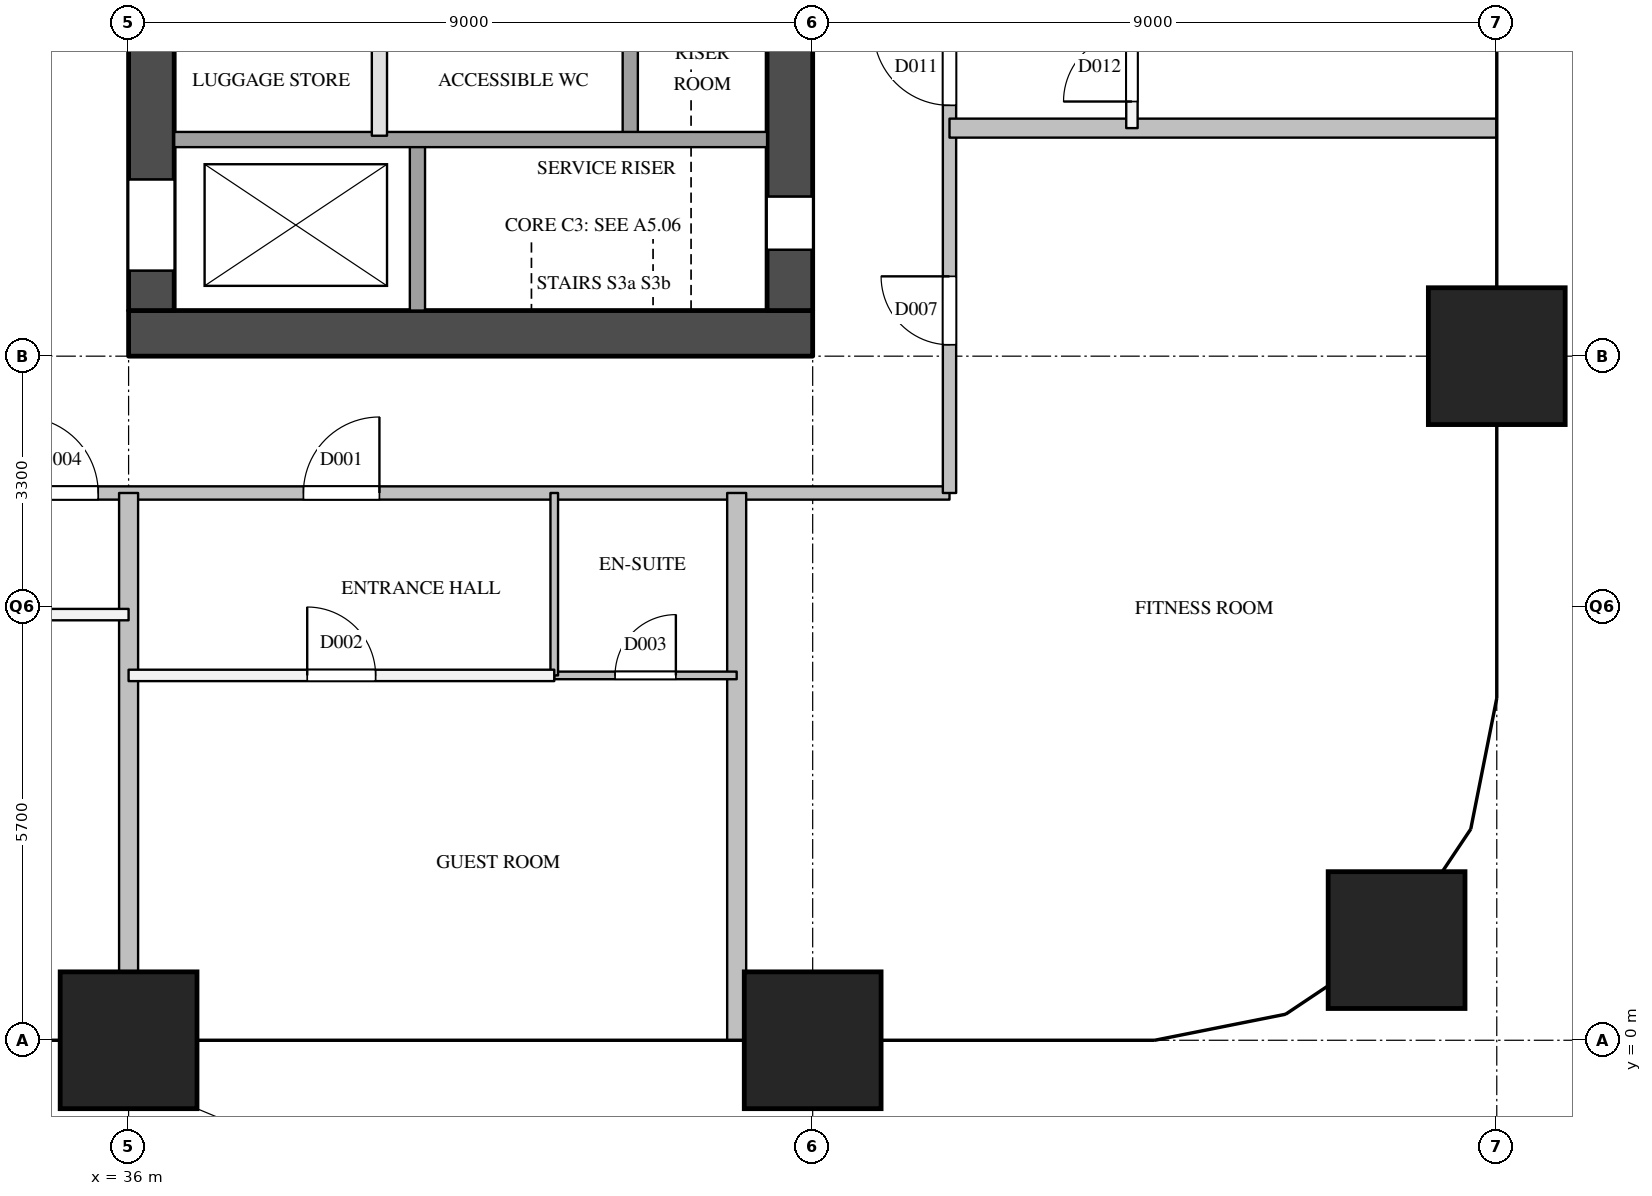
"""IFC4 building model, lengths in metres.
Left out: names, types, materials, properties, quantities, classifications, styles, units other than length and angle.
Written with IfcOpenShell. Run it as: python <this file> out.ifc"""

import sys

from ifc_helpers import new_model, si_unit, direction, frame, frame_2d, origin, origin_2d, place, context, subcontext, project, spatial, rectangle, extrude, element, fill, save


model = new_model("IFC4")
c1 = context("Model", 3, precision=1e-05, world=origin(), true_north=direction((0.0, 1.0)))
c2 = subcontext(c1, "Body", "Model", "MODEL_VIEW")
j1 = project(units=[si_unit("LENGTHUNIT", "METRE"), si_unit("PLANEANGLEUNIT", "RADIAN")], contexts=[c1])
p1 = place(None, origin())
s1 = spatial("IfcSite", under=j1, at=p1, CompositionType="ELEMENT")
p2 = place(p1, origin())
s2 = spatial("IfcBuilding", under=s1, at=p2, CompositionType="ELEMENT")
p3 = place(p2, frame((0.0, 0.0, 108.2)))
s3 = spatial("IfcBuildingStorey", under=s2, at=p3, CompositionType="ELEMENT", Elevation=108.2)
for number, where, z_axis, x_axis in (
    (1, (36.0, 0.0, 0.0), (0.0, 0.0, 1.0), (1.0, 0.0, 0.0)),
    (2, (45.0, 0.0, 0.0), (0.0, 0.0, 1.0), (1.0, 0.0, 0.0)),
    (3, (52.682, 1.318, 0.0), (0.0, 0.0, 1.0), (1.0, 0.0, 0.0)),
    (4, (54.0, 9.0, 0.0), (0.0, 0.0, 1.0), (1.0, 0.0, 0.0)),
):
    element("IfcColumn", number, at=place(p3, frame(where, z_axis=z_axis, x_axis=x_axis)), inside=s3, PredefinedType="COLUMN", context=c2, shape_type="SweptSolid", body=[
        extrude(rectangle(XDim=1.8, YDim=1.8, at=origin_2d()), origin(), (0.0, 0.0, 1.0), 3.8),
    ])
p4 = place(p3, frame((36.0, 9.3, 0.0), z_axis=(0.0, 0.0, 1.0), x_axis=(1.0, 0.0, 0.0)))
e5 = element("IfcWall", 5, at=p4, inside=s3, PredefinedType="SHEAR", context=c2, shape_type="SweptSolid", body=[
    extrude(rectangle(XDim=9.0, YDim=0.6, at=frame_2d((4.5, 0.0))), origin(), (0.0, 0.0, 1.0), 3.5),
])
p5 = place(p3, frame((36.3, 9.6, 0.0), z_axis=(0.0, 0.0, 1.0), x_axis=(0.0, 1.0, 0.0)))
e6 = element("IfcWall", 6, at=p5, inside=s3, PredefinedType="SHEAR", context=c2, shape_type="SweptSolid", body=[
    extrude(rectangle(XDim=12.3, YDim=0.6, at=frame_2d((6.15, 0.0))), origin(), (0.0, 0.0, 1.0), 3.5),
])
p6 = place(p5, frame((0.525, 0.0, 0.0)))
e7 = element("IfcOpeningElement", 7, at=p6, cuts=e6, PredefinedType="OPENING", context=c2, shape_type="SweptSolid", body=[
    extrude(rectangle(XDim=1.2, YDim=2.1, at=frame_2d((0.6, 1.05))), frame((0.0, 0.31, 0.0), z_axis=(0.0, -1.0, 0.0), x_axis=(1.0, 0.0, 0.0)), (0.0, 0.0, 1.0), 0.62),
])
p7 = place(p5, frame((4.8, 0.0, 0.0)))
e8 = element("IfcOpeningElement", 8, at=p7, cuts=e6, PredefinedType="OPENING", context=c2, shape_type="SweptSolid", body=[
    extrude(rectangle(XDim=1.0, YDim=2.1, at=frame_2d((0.5, 1.05))), frame((0.0, 0.31, 0.0), z_axis=(0.0, -1.0, 0.0), x_axis=(1.0, 0.0, 0.0)), (0.0, 0.0, 1.0), 0.62),
])
p8 = place(p3, frame((44.7, 9.6, 0.0), z_axis=(0.0, 0.0, 1.0), x_axis=(0.0, 1.0, 0.0)))
e9 = element("IfcWall", 9, at=p8, inside=s3, PredefinedType="SHEAR", context=c2, shape_type="SweptSolid", body=[
    extrude(rectangle(XDim=12.3, YDim=0.6, at=frame_2d((6.15, 0.0))), origin(), (0.0, 0.0, 1.0), 3.5),
])
p9 = place(p8, frame((0.8, 0.0, 0.0)))
e10 = element("IfcOpeningElement", 10, at=p9, cuts=e9, PredefinedType="OPENING", context=c2, shape_type="SweptSolid", body=[
    extrude(rectangle(XDim=0.7, YDim=2.1, at=frame_2d((0.35, 1.05))), frame((0.0, 0.31, 0.0), z_axis=(0.0, -1.0, 0.0), x_axis=(1.0, 0.0, 0.0)), (0.0, 0.0, 1.0), 0.62),
])
p10 = place(p3, frame((39.3, 11.9, 0.0), z_axis=(0.0, 0.0, 1.0), x_axis=(0.0, 1.0, 0.0)))
e11 = element("IfcWall", 11, at=p10, inside=s3, PredefinedType="PARTITIONING", context=c2, shape_type="SweptSolid", body=[
    extrude(rectangle(XDim=2.2, YDim=0.2, at=frame_2d((1.1, 0.0))), origin(), (0.0, 0.0, 1.0), 3.5),
])
p11 = place(p3, frame((39.8, 9.6, 0.0), z_axis=(0.0, 0.0, 1.0), x_axis=(0.0, 1.0, 0.0)))
e12 = element("IfcWall", 12, at=p11, inside=s3, PredefinedType="SOLIDWALL", context=c2, shape_type="SweptSolid", body=[
    extrude(rectangle(XDim=2.3, YDim=0.2, at=frame_2d((1.15, 0.0))), origin(), (0.0, 0.0, 1.0), 3.5),
])
p12 = place(p3, frame((42.6, 11.9, 0.0), z_axis=(0.0, 0.0, 1.0), x_axis=(0.0, 1.0, 0.0)))
e13 = element("IfcWall", 13, at=p12, inside=s3, PredefinedType="SOLIDWALL", context=c2, shape_type="SweptSolid", body=[
    extrude(rectangle(XDim=2.2, YDim=0.2, at=frame_2d((1.1, 0.0))), origin(), (0.0, 0.0, 1.0), 3.5),
])
p13 = place(p3, frame((36.6, 11.85, 0.0), z_axis=(0.0, 0.0, 1.0), x_axis=(1.0, 0.0, 0.0)))
e14 = element("IfcWall", 14, at=p13, inside=s3, PredefinedType="SOLIDWALL", context=c2, shape_type="SweptSolid", body=[
    extrude(rectangle(XDim=7.8, YDim=0.2, at=frame_2d((3.9, 0.0))), origin(), (0.0, 0.0, 1.0), 3.5),
])
p14 = place(p3, frame((34.2, 7.2, 0.0), z_axis=(0.0, 0.0, 1.0), x_axis=(1.0, 0.0, 0.0)))
e15 = element("IfcWall", 15, at=p14, inside=s3, PredefinedType="PARTITIONING", context=c2, shape_type="SweptSolid", body=[
    extrude(rectangle(XDim=12.6, YDim=0.175, at=frame_2d((6.3, 0.0))), origin(), (0.0, 0.0, 1.0), 3.5),
])
p15 = place(p14, frame((4.1, 0.0, 0.0)))
e16 = element("IfcOpeningElement", 16, at=p15, cuts=e15, PredefinedType="OPENING", context=c2, shape_type="SweptSolid", body=[
    extrude(rectangle(XDim=1.0, YDim=2.1, at=frame_2d((0.5, 1.05))), frame((0.0, 0.097, 0.0), z_axis=(0.0, -1.0, 0.0), x_axis=(1.0, 0.0, 0.0)), (0.0, 0.0, 1.0), 0.195),
])
p16 = place(p14, frame((0.4, 0.0, 0.0)))
e17 = element("IfcOpeningElement", 17, at=p16, cuts=e15, PredefinedType="OPENING", context=c2, shape_type="SweptSolid", body=[
    extrude(rectangle(XDim=1.0, YDim=2.1, at=frame_2d((0.5, 1.05))), frame((0.0, 0.097, 0.0), z_axis=(0.0, -1.0, 0.0), x_axis=(1.0, 0.0, 0.0)), (0.0, 0.0, 1.0), 0.195),
])
p17 = place(p3, frame((46.8, 7.2, 0.0), z_axis=(0.0, 0.0, 1.0), x_axis=(0.0, 1.0, 0.0)))
e18 = element("IfcWall", 18, at=p17, inside=s3, PredefinedType="PARTITIONING", context=c2, shape_type="SweptSolid", body=[
    extrude(rectangle(XDim=16.49, YDim=0.175, at=frame_2d((8.245, 0.0))), origin(), (0.0, 0.0, 1.0), 3.5),
])
p18 = place(p17, frame((1.95, 0.0, 0.0)))
e19 = element("IfcOpeningElement", 19, at=p18, cuts=e18, PredefinedType="OPENING", context=c2, shape_type="SweptSolid", body=[
    extrude(rectangle(XDim=0.9, YDim=2.1, at=frame_2d((0.45, 1.05))), frame((0.0, 0.097, 0.0), z_axis=(0.0, -1.0, 0.0), x_axis=(1.0, 0.0, 0.0)), (0.0, 0.0, 1.0), 0.195),
])
p19 = place(p17, frame((5.1, 0.0, 0.0)))
e20 = element("IfcOpeningElement", 20, at=p19, cuts=e18, PredefinedType="OPENING", context=c2, shape_type="SweptSolid", body=[
    extrude(rectangle(XDim=1.0, YDim=2.1, at=frame_2d((0.5, 1.05))), frame((0.0, 0.097, 0.0), z_axis=(0.0, -1.0, 0.0), x_axis=(1.0, 0.0, 0.0)), (0.0, 0.0, 1.0), 0.195),
])
p20 = place(p17, frame((11.1, 0.0, 0.0)))
e21 = element("IfcOpeningElement", 21, at=p20, cuts=e18, PredefinedType="OPENING", context=c2, shape_type="SweptSolid", body=[
    extrude(rectangle(XDim=1.0, YDim=2.1, at=frame_2d((0.5, 1.05))), frame((0.0, 0.097, 0.0), z_axis=(0.0, -1.0, 0.0), x_axis=(1.0, 0.0, 0.0)), (0.0, 0.0, 1.0), 0.195),
])
p21 = place(p3, frame((36.0, 4.8, 0.0), z_axis=(0.0, 0.0, 1.0), x_axis=(1.0, 0.0, 0.0)))
e22 = element("IfcWall", 22, at=p21, inside=s3, PredefinedType="PARTITIONING", context=c2, shape_type="SweptSolid", body=[
    extrude(rectangle(XDim=5.6, YDim=0.15, at=frame_2d((2.8, 0.0))), origin(), (0.0, 0.0, 1.0), 3.5),
])
p22 = place(p21, frame((2.35, 0.0, 0.0)))
e23 = element("IfcOpeningElement", 23, at=p22, cuts=e22, PredefinedType="OPENING", context=c2, shape_type="SweptSolid", body=[
    extrude(rectangle(XDim=0.9, YDim=2.1, at=frame_2d((0.45, 1.05))), frame((0.0, 0.085, 0.0), z_axis=(0.0, -1.0, 0.0), x_axis=(1.0, 0.0, 0.0)), (0.0, 0.0, 1.0), 0.17),
])
p23 = place(p3, frame((29.4, 5.6, 0.0), z_axis=(0.0, 0.0, 1.0), x_axis=(1.0, 0.0, 0.0)))
e24 = element("IfcWall", 24, at=p23, inside=s3, PredefinedType="PARTITIONING", context=c2, shape_type="SweptSolid", body=[
    extrude(rectangle(XDim=6.6, YDim=0.15, at=frame_2d((3.3, 0.0))), origin(), (0.0, 0.0, 1.0), 3.5),
])
p24 = place(p23, frame((2.85, 0.0, 0.0)))
e25 = element("IfcOpeningElement", 25, at=p24, cuts=e24, PredefinedType="OPENING", context=c2, shape_type="SweptSolid", body=[
    extrude(rectangle(XDim=0.9, YDim=2.1, at=frame_2d((0.45, 1.05))), frame((0.0, 0.085, 0.0), z_axis=(0.0, -1.0, 0.0), x_axis=(1.0, 0.0, 0.0)), (0.0, 0.0, 1.0), 0.17),
])
p25 = place(p3, frame((49.2, 12.0, 0.0), z_axis=(0.0, 0.0, 1.0), x_axis=(0.0, 1.0, 0.0)))
e26 = element("IfcWall", 26, at=p25, inside=s3, PredefinedType="PARTITIONING", context=c2, shape_type="SweptSolid", body=[
    extrude(rectangle(XDim=1.6, YDim=0.15, at=frame_2d((0.8, 0.0))), origin(), (0.0, 0.0, 1.0), 3.5),
])
p26 = place(p25, frame((0.35, 0.0, 0.0)))
e27 = element("IfcOpeningElement", 27, at=p26, cuts=e26, PredefinedType="OPENING", context=c2, shape_type="SweptSolid", body=[
    extrude(rectangle(XDim=0.9, YDim=2.1, at=frame_2d((0.45, 1.05))), frame((0.0, 0.085, 0.0), z_axis=(0.0, -1.0, 0.0), x_axis=(1.0, 0.0, 0.0)), (0.0, 0.0, 1.0), 0.17),
])
p27 = place(p3, frame((46.8, 12.0, 0.0), z_axis=(0.0, 0.0, 1.0), x_axis=(1.0, 0.0, 0.0)))
e28 = element("IfcWall", 28, at=p27, inside=s3, PredefinedType="PARTITIONING", context=c2, shape_type="SweptSolid", body=[
    extrude(rectangle(XDim=7.2, YDim=0.25, at=frame_2d((3.6, 0.0))), origin(), (0.0, 0.0, 1.0), 2.5),
])
p28 = place(p3, frame((36.0, 0.0, 0.0), z_axis=(0.0, 0.0, 1.0), x_axis=(0.0, 1.0, 0.0)))
e29 = element("IfcWall", 29, at=p28, inside=s3, PredefinedType="PARTITIONING", context=c2, shape_type="SweptSolid", body=[
    extrude(rectangle(XDim=7.2, YDim=0.25, at=frame_2d((3.6, 0.0))), origin(), (0.0, 0.0, 1.0), 3.5),
])
p29 = place(p3, frame((44.0, 0.0, 0.0), z_axis=(0.0, 0.0, 1.0), x_axis=(0.0, 1.0, 0.0)))
e30 = element("IfcWall", 30, at=p29, inside=s3, PredefinedType="PARTITIONING", context=c2, shape_type="SweptSolid", body=[
    extrude(rectangle(XDim=7.2, YDim=0.25, at=frame_2d((3.6, 0.0))), origin(), (0.0, 0.0, 1.0), 2.5),
])
p30 = place(p3, frame((41.6, 4.8, 0.0), z_axis=(0.0, 0.0, 1.0), x_axis=(1.0, 0.0, 0.0)))
e31 = element("IfcWall", 31, at=p30, inside=s3, PredefinedType="PARTITIONING", context=c2, shape_type="SweptSolid", body=[
    extrude(rectangle(XDim=2.4, YDim=0.1, at=frame_2d((1.2, 0.0))), origin(), (0.0, 0.0, 1.0), 3.5),
])
p31 = place(p30, frame((0.8, 0.0, 0.0)))
e32 = element("IfcOpeningElement", 32, at=p31, cuts=e31, PredefinedType="OPENING", context=c2, shape_type="SweptSolid", body=[
    extrude(rectangle(XDim=0.8, YDim=2.1, at=frame_2d((0.4, 1.05))), frame((0.0, 0.06, 0.0), z_axis=(0.0, -1.0, 0.0), x_axis=(1.0, 0.0, 0.0)), (0.0, 0.0, 1.0), 0.12),
])
p32 = place(p3, frame((41.6, 4.8, 0.0), z_axis=(0.0, 0.0, 1.0), x_axis=(0.0, 1.0, 0.0)))
e33 = element("IfcWall", 33, at=p32, inside=s3, PredefinedType="PARTITIONING", context=c2, shape_type="SweptSolid", body=[
    extrude(rectangle(XDim=2.4, YDim=0.1, at=frame_2d((1.2, 0.0))), origin(), (0.0, 0.0, 1.0), 3.5),
])
p33 = place(p6, origin())
e34 = element("IfcDoor", 34, at=p33, inside=s3, OperationType="SLIDING_TO_LEFT", PredefinedType="DOOR", context=c2, shape_type="SweptSolid", body=[
    extrude(rectangle(XDim=1.2, YDim=2.1, at=frame_2d((0.6, 1.05))), frame((0.0, 0.025, 0.0), z_axis=(0.0, -1.0, 0.0), x_axis=(1.0, 0.0, 0.0)), (0.0, 0.0, 1.0), 0.05),
])
fill(e7, e34)
p34 = place(p9, origin())
e35 = element("IfcDoor", 35, at=p34, inside=s3, OperationType="SINGLE_SWING_LEFT", PredefinedType="DOOR", context=c2, shape_type="SweptSolid", body=[
    extrude(rectangle(XDim=0.7, YDim=2.1, at=frame_2d((0.35, 1.05))), frame((0.0, 0.025, 0.0), z_axis=(0.0, -1.0, 0.0), x_axis=(1.0, 0.0, 0.0)), (0.0, 0.0, 1.0), 0.05),
])
fill(e10, e35)
p35 = place(p15, origin())
e36 = element("IfcDoor", 36, at=p35, inside=s3, OperationType="SINGLE_SWING_RIGHT", PredefinedType="DOOR", context=c2, shape_type="SweptSolid", body=[
    extrude(rectangle(XDim=1.0, YDim=2.1, at=frame_2d((0.5, 1.05))), frame((0.0, 0.025, 0.0), z_axis=(0.0, -1.0, 0.0), x_axis=(1.0, 0.0, 0.0)), (0.0, 0.0, 1.0), 0.05),
])
fill(e16, e36)
p36 = place(p22, origin())
e37 = element("IfcDoor", 37, at=p36, inside=s3, OperationType="SINGLE_SWING_LEFT", PredefinedType="DOOR", context=c2, shape_type="SweptSolid", body=[
    extrude(rectangle(XDim=0.9, YDim=2.1, at=frame_2d((0.45, 1.05))), frame((0.0, 0.025, 0.0), z_axis=(0.0, -1.0, 0.0), x_axis=(1.0, 0.0, 0.0)), (0.0, 0.0, 1.0), 0.05),
])
fill(e23, e37)
p37 = place(p31, origin())
e38 = element("IfcDoor", 38, at=p37, inside=s3, OperationType="SINGLE_SWING_RIGHT", PredefinedType="DOOR", context=c2, shape_type="SweptSolid", body=[
    extrude(rectangle(XDim=0.8, YDim=2.1, at=frame_2d((0.4, 1.05))), frame((0.0, 0.025, 0.0), z_axis=(0.0, -1.0, 0.0), x_axis=(1.0, 0.0, 0.0)), (0.0, 0.0, 1.0), 0.05),
])
fill(e32, e38)
p38 = place(p16, origin())
e39 = element("IfcDoor", 39, at=p38, inside=s3, OperationType="SINGLE_SWING_LEFT", PredefinedType="DOOR", context=c2, shape_type="SweptSolid", body=[
    extrude(rectangle(XDim=1.0, YDim=2.1, at=frame_2d((0.5, 1.05))), frame((0.0, 0.025, 0.0), z_axis=(0.0, -1.0, 0.0), x_axis=(1.0, 0.0, 0.0)), (0.0, 0.0, 1.0), 0.05),
])
fill(e17, e39)
p39 = place(p18, origin())
e40 = element("IfcDoor", 40, at=p39, inside=s3, OperationType="SINGLE_SWING_RIGHT", PredefinedType="DOOR", context=c2, shape_type="SweptSolid", body=[
    extrude(rectangle(XDim=0.9, YDim=2.1, at=frame_2d((0.45, 1.05))), frame((0.0, 0.025, 0.0), z_axis=(0.0, -1.0, 0.0), x_axis=(1.0, 0.0, 0.0)), (0.0, 0.0, 1.0), 0.05),
])
fill(e19, e40)
p40 = place(p19, origin())
e41 = element("IfcDoor", 41, at=p40, inside=s3, OperationType="SINGLE_SWING_RIGHT", PredefinedType="DOOR", context=c2, shape_type="SweptSolid", body=[
    extrude(rectangle(XDim=1.0, YDim=2.1, at=frame_2d((0.5, 1.05))), frame((0.0, 0.025, 0.0), z_axis=(0.0, -1.0, 0.0), x_axis=(1.0, 0.0, 0.0)), (0.0, 0.0, 1.0), 0.05),
])
fill(e20, e41)
p41 = place(p26, origin())
e42 = element("IfcDoor", 42, at=p41, inside=s3, OperationType="SINGLE_SWING_LEFT", PredefinedType="DOOR", context=c2, shape_type="SweptSolid", body=[
    extrude(rectangle(XDim=0.9, YDim=2.1, at=frame_2d((0.45, 1.05))), frame((0.0, 0.025, 0.0), z_axis=(0.0, -1.0, 0.0), x_axis=(1.0, 0.0, 0.0)), (0.0, 0.0, 1.0), 0.05),
])
fill(e27, e42)
save(model, sys.argv[1])
